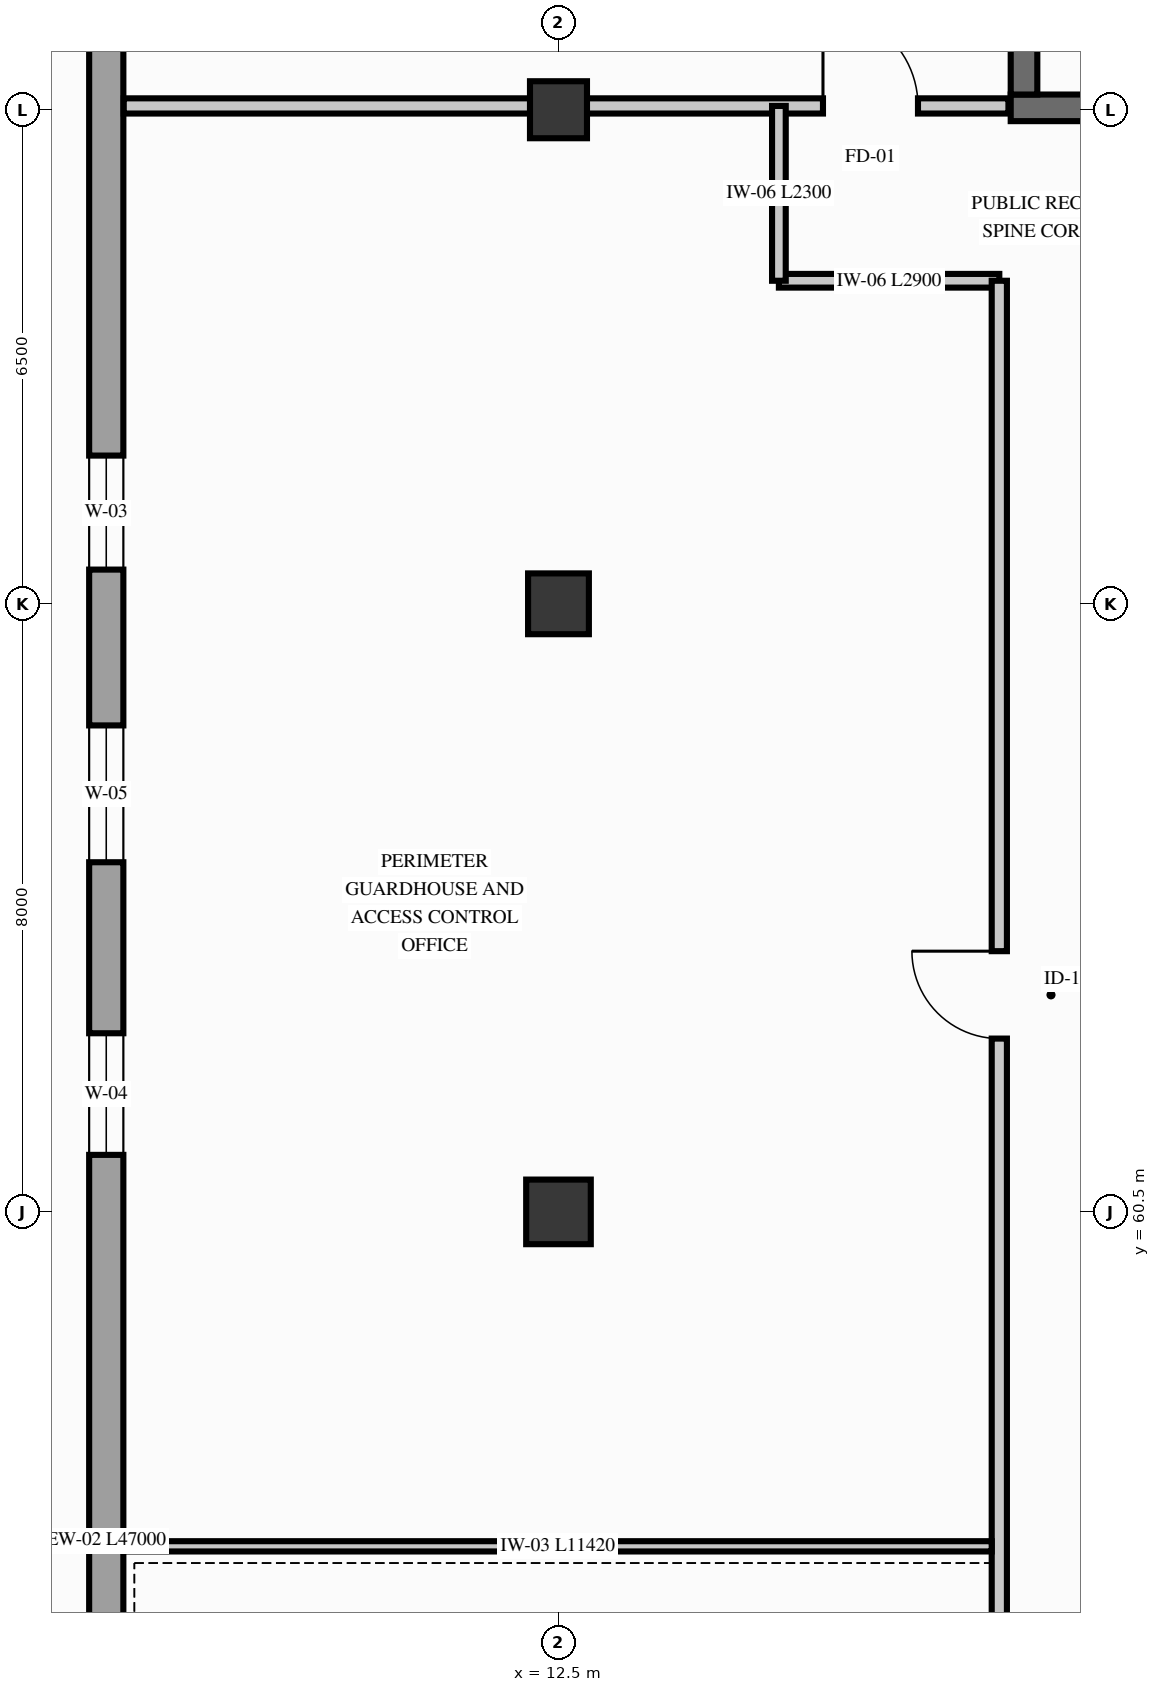
"""IFC4 building model, lengths in metres.
Left out: names, types, materials, properties, quantities, classifications, styles, units other than length and angle.
Written with IfcOpenShell. Run it as: python <this file> out.ifc"""

import sys

from ifc_helpers import new_model, si_unit, direction, frame, frame_2d, origin, origin_2d, place, context, subcontext, project, spatial, rectangle, extrude, element, fill, save


model = new_model("IFC4")
c1 = context("Model", 3, precision=1e-05, world=origin(), true_north=direction((0.0, 1.0)))
c2 = subcontext(c1, "Body", "Model", "MODEL_VIEW")
j1 = project(units=[si_unit("LENGTHUNIT", "METRE"), si_unit("PLANEANGLEUNIT", "RADIAN")], contexts=[c1])
p1 = place(None, origin())
s1 = spatial("IfcSite", under=j1, at=p1, CompositionType="ELEMENT")
p2 = place(p1, origin())
s2 = spatial("IfcBuilding", under=s1, at=p2, CompositionType="ELEMENT")
p3 = place(p2, origin())
s3 = spatial("IfcBuildingStorey", under=s2, at=p3, CompositionType="ELEMENT", Elevation=0.0)
p4 = place(p3, frame((18.45, 75.025, 0.0), z_axis=(0.0, 0.0, 1.0), x_axis=(1.0, 0.0, 0.0)))
e1 = element("IfcWall", 1, at=p4, inside=s3, PredefinedType="SHEAR", context=c2, shape_type="SweptSolid", body=[
    extrude(rectangle(XDim=8.3, YDim=0.35, at=frame_2d((4.15, 0.0))), origin(), (0.0, 0.0, 1.0), 4.88),
])
p5 = place(p3, frame((18.625, 75.2, 0.0), z_axis=(0.0, 0.0, 1.0), x_axis=(0.0, 1.0, 0.0)))
e2 = element("IfcWall", 2, at=p5, inside=s3, PredefinedType="SHEAR", context=c2, shape_type="SweptSolid", body=[
    extrude(rectangle(XDim=6.8, YDim=0.35, at=frame_2d((3.4, 0.0))), origin(), (0.0, 0.0, 1.0), 4.88),
])
p6 = place(p5, frame((2.6, 0.0, 0.0)))
e3 = element("IfcOpeningElement", 3, at=p6, cuts=e2, PredefinedType="OPENING", context=c2, shape_type="SweptSolid", body=[
    extrude(rectangle(XDim=1.32, YDim=2.24, at=frame_2d((0.66, 1.12))), frame((0.0, 0.185, 0.0), z_axis=(0.0, -1.0, 0.0), x_axis=(1.0, 0.0, 0.0)), (0.0, 0.0, 1.0), 0.37),
])
p7 = place(p3, frame((12.5, 60.5, 0.0), z_axis=(0.0, 0.0, 1.0), x_axis=(1.0, 0.0, 0.0)))
e4 = element("IfcColumn", 4, at=p7, inside=s3, PredefinedType="COLUMN", context=c2, shape_type="SweptSolid", body=[
    extrude(rectangle(XDim=0.85, YDim=0.85, at=origin_2d()), origin(), (0.0, 0.0, 1.0), 5.1),
])
p8 = place(p3, frame((12.5, 68.5, 0.0), z_axis=(0.0, 0.0, 1.0), x_axis=(1.0, 0.0, 0.0)))
e5 = element("IfcColumn", 5, at=p8, inside=s3, PredefinedType="COLUMN", context=c2, shape_type="SweptSolid", body=[
    extrude(rectangle(XDim=0.8, YDim=0.8, at=origin_2d()), origin(), (0.0, 0.0, 1.0), 5.1),
])
p9 = place(p3, frame((12.5, 75.0, 0.0), z_axis=(0.0, 0.0, 1.0), x_axis=(1.0, 0.0, 0.0)))
e6 = element("IfcColumn", 6, at=p9, inside=s3, PredefinedType="COLUMN", context=c2, shape_type="SweptSolid", body=[
    extrude(rectangle(XDim=0.75, YDim=0.75, at=origin_2d()), origin(), (0.0, 0.0, 1.0), 5.1),
])
p10 = place(p3, frame((6.55, 36.5, 0.0), z_axis=(0.0, 0.0, 1.0), x_axis=(0.0, 1.0, 0.0)))
e7 = element("IfcWall", 7, at=p10, inside=s3, PredefinedType="SOLIDWALL", context=c2, shape_type="SweptSolid", body=[
    extrude(rectangle(XDim=47.0, YDim=0.45, at=frame_2d((23.5, 0.0))), origin(), (0.0, 0.0, 1.0), 4.368),
])
p11 = place(p10, frame((40.5, 0.0, 0.0)))
e8 = element("IfcOpeningElement", 8, at=p11, cuts=e7, PredefinedType="OPENING", context=c2, shape_type="SweptSolid", body=[
    extrude(rectangle(XDim=1.8, YDim=2.4, at=frame_2d((0.9, 1.2))), frame((0.0, 0.235, 0.0), z_axis=(0.0, -1.0, 0.0), x_axis=(1.0, 0.0, 0.0)), (0.0, 0.0, 1.0), 0.47),
])
p12 = place(p10, frame((1.65, 0.0, 0.85)))
e9 = element("IfcOpeningElement", 9, at=p12, cuts=e7, PredefinedType="OPENING", context=c2, shape_type="SweptSolid", body=[
    extrude(rectangle(XDim=1.6, YDim=2.4, at=frame_2d((0.8, 1.2))), frame((0.0, 0.235, 0.0), z_axis=(0.0, -1.0, 0.0), x_axis=(1.0, 0.0, 0.0)), (0.0, 0.0, 1.0), 0.47),
])
p13 = place(p10, frame((5.5, 0.0, 0.85)))
e10 = element("IfcOpeningElement", 10, at=p13, cuts=e7, PredefinedType="OPENING", context=c2, shape_type="SweptSolid", body=[
    extrude(rectangle(XDim=1.8, YDim=2.4, at=frame_2d((0.9, 1.2))), frame((0.0, 0.235, 0.0), z_axis=(0.0, -1.0, 0.0), x_axis=(1.0, 0.0, 0.0)), (0.0, 0.0, 1.0), 0.47),
])
p14 = place(p10, frame((9.35, 0.0, 0.85)))
e11 = element("IfcOpeningElement", 11, at=p14, cuts=e7, PredefinedType="OPENING", context=c2, shape_type="SweptSolid", body=[
    extrude(rectangle(XDim=1.5, YDim=2.3, at=frame_2d((0.75, 1.15))), frame((0.0, 0.235, 0.0), z_axis=(0.0, -1.0, 0.0), x_axis=(1.0, 0.0, 0.0)), (0.0, 0.0, 1.0), 0.47),
])
p15 = place(p10, frame((13.2, 0.0, 0.85)))
e12 = element("IfcOpeningElement", 12, at=p15, cuts=e7, PredefinedType="OPENING", context=c2, shape_type="SweptSolid", body=[
    extrude(rectangle(XDim=1.4, YDim=2.2, at=frame_2d((0.7, 1.1))), frame((0.0, 0.235, 0.0), z_axis=(0.0, -1.0, 0.0), x_axis=(1.0, 0.0, 0.0)), (0.0, 0.0, 1.0), 0.47),
])
p16 = place(p10, frame((24.75, 0.0, 0.85)))
e13 = element("IfcOpeningElement", 13, at=p16, cuts=e7, PredefinedType="OPENING", context=c2, shape_type="SweptSolid", body=[
    extrude(rectangle(XDim=1.6, YDim=2.4, at=frame_2d((0.8, 1.2))), frame((0.0, 0.235, 0.0), z_axis=(0.0, -1.0, 0.0), x_axis=(1.0, 0.0, 0.0)), (0.0, 0.0, 1.0), 0.47),
])
p17 = place(p10, frame((28.6, 0.0, 0.85)))
e14 = element("IfcOpeningElement", 14, at=p17, cuts=e7, PredefinedType="OPENING", context=c2, shape_type="SweptSolid", body=[
    extrude(rectangle(XDim=1.8, YDim=2.4, at=frame_2d((0.9, 1.2))), frame((0.0, 0.235, 0.0), z_axis=(0.0, -1.0, 0.0), x_axis=(1.0, 0.0, 0.0)), (0.0, 0.0, 1.0), 0.47),
])
p18 = place(p10, frame((32.45, 0.0, 0.85)))
e15 = element("IfcOpeningElement", 15, at=p18, cuts=e7, PredefinedType="OPENING", context=c2, shape_type="SweptSolid", body=[
    extrude(rectangle(XDim=1.5, YDim=2.3, at=frame_2d((0.75, 1.15))), frame((0.0, 0.235, 0.0), z_axis=(0.0, -1.0, 0.0), x_axis=(1.0, 0.0, 0.0)), (0.0, 0.0, 1.0), 0.47),
])
p19 = place(p3, frame((6.78, 75.05, 0.0), z_axis=(0.0, 0.0, 1.0), x_axis=(1.0, 0.0, 0.0)))
e16 = element("IfcWall", 16, at=p19, inside=s3, PredefinedType="PARTITIONING", context=c2, shape_type="SweptSolid", body=[
    extrude(rectangle(XDim=11.64, YDim=0.2, at=frame_2d((5.82, 0.0))), origin(), (0.0, 0.0, 1.0), 4.37),
])
p20 = place(p19, frame((9.2, 0.0, 0.0)))
e17 = element("IfcOpeningElement", 17, at=p20, cuts=e16, PredefinedType="OPENING", context=c2, shape_type="SweptSolid", body=[
    extrude(rectangle(XDim=1.25, YDim=2.2, at=frame_2d((0.625, 1.1))), frame((0.0, 0.11, 0.0), z_axis=(0.0, -1.0, 0.0), x_axis=(1.0, 0.0, 0.0)), (0.0, 0.0, 1.0), 0.22),
])
p21 = place(p3, frame((15.4, 72.75, 0.0), z_axis=(0.0, 0.0, 1.0), x_axis=(1.0, 0.0, 0.0)))
e18 = element("IfcWall", 18, at=p21, inside=s3, PredefinedType="PARTITIONING", context=c2, shape_type="SweptSolid", body=[
    extrude(rectangle(XDim=2.9, YDim=0.18, at=frame_2d((1.45, 0.0))), origin(), (0.0, 0.0, 1.0), 4.54),
])
p22 = place(p3, frame((15.4, 72.75, 0.0), z_axis=(0.0, 0.0, 1.0), x_axis=(0.0, 1.0, 0.0)))
e19 = element("IfcWall", 19, at=p22, inside=s3, PredefinedType="PARTITIONING", context=c2, shape_type="SweptSolid", body=[
    extrude(rectangle(XDim=2.3, YDim=0.18, at=frame_2d((1.15, 0.0))), origin(), (0.0, 0.0, 1.0), 4.86),
])
p23 = place(p3, frame((18.3, 6.78, 0.0), z_axis=(0.0, 0.0, 1.0), x_axis=(0.0, 1.0, 0.0)))
e20 = element("IfcWall", 20, at=p23, inside=s3, PredefinedType="PARTITIONING", context=c2, shape_type="SweptSolid", body=[
    extrude(rectangle(XDim=65.97, YDim=0.2, at=frame_2d((32.985, 0.0))), origin(), (0.0, 0.0, 1.0), 4.368),
])
p24 = place(p23, frame((4.5, 0.0, 0.0)))
e21 = element("IfcOpeningElement", 21, at=p24, cuts=e20, PredefinedType="OPENING", context=c2, shape_type="SweptSolid", body=[
    extrude(rectangle(XDim=1.6, YDim=2.3, at=frame_2d((0.8, 1.15))), frame((0.0, 0.11, 0.0), z_axis=(0.0, -1.0, 0.0), x_axis=(1.0, 0.0, 0.0)), (0.0, 0.0, 1.0), 0.22),
])
p25 = place(p23, frame((18.0, 0.0, 0.0)))
e22 = element("IfcOpeningElement", 22, at=p25, cuts=e20, PredefinedType="OPENING", context=c2, shape_type="SweptSolid", body=[
    extrude(rectangle(XDim=1.15, YDim=2.2, at=frame_2d((0.575, 1.1))), frame((0.0, 0.11, 0.0), z_axis=(0.0, -1.0, 0.0), x_axis=(1.0, 0.0, 0.0)), (0.0, 0.0, 1.0), 0.22),
])
p26 = place(p23, frame((38.0, 0.0, 0.0)))
e23 = element("IfcOpeningElement", 23, at=p26, cuts=e20, PredefinedType="OPENING", context=c2, shape_type="SweptSolid", body=[
    extrude(rectangle(XDim=0.98, YDim=2.16, at=frame_2d((0.49, 1.08))), frame((0.0, 0.11, 0.0), z_axis=(0.0, -1.0, 0.0), x_axis=(1.0, 0.0, 0.0)), (0.0, 0.0, 1.0), 0.22),
])
p27 = place(p23, frame((56.0, 0.0, 0.0)))
e24 = element("IfcOpeningElement", 24, at=p27, cuts=e20, PredefinedType="OPENING", context=c2, shape_type="SweptSolid", body=[
    extrude(rectangle(XDim=1.15, YDim=2.2, at=frame_2d((0.575, 1.1))), frame((0.0, 0.11, 0.0), z_axis=(0.0, -1.0, 0.0), x_axis=(1.0, 0.0, 0.0)), (0.0, 0.0, 1.0), 0.22),
])
p28 = place(p3, frame((6.78, 56.1, 0.0), z_axis=(0.0, 0.0, 1.0), x_axis=(1.0, 0.0, 0.0)))
e25 = element("IfcWall", 25, at=p28, inside=s3, PredefinedType="PARTITIONING", context=c2, shape_type="SweptSolid", body=[
    extrude(rectangle(XDim=11.42, YDim=0.135, at=frame_2d((5.71, 0.0))), origin(), (0.0, 0.0, 1.0), 4.378),
])
p29 = place(p16, origin())
e26 = element("IfcWindow", 26, at=p29, inside=s3, PartitioningType="SINGLE_PANEL", PredefinedType="WINDOW", context=c2, shape_type="SweptSolid", body=[
    extrude(rectangle(XDim=1.6, YDim=2.4, at=frame_2d((0.8, 1.2))), frame((0.0, 0.03, 0.0), z_axis=(0.0, -1.0, 0.0), x_axis=(1.0, 0.0, 0.0)), (0.0, 0.0, 1.0), 0.06),
])
fill(e13, e26)
p30 = place(p17, origin())
e27 = element("IfcWindow", 27, at=p30, inside=s3, PartitioningType="SINGLE_PANEL", PredefinedType="WINDOW", context=c2, shape_type="SweptSolid", body=[
    extrude(rectangle(XDim=1.8, YDim=2.4, at=frame_2d((0.9, 1.2))), frame((0.0, 0.03, 0.0), z_axis=(0.0, -1.0, 0.0), x_axis=(1.0, 0.0, 0.0)), (0.0, 0.0, 1.0), 0.06),
])
fill(e14, e27)
p31 = place(p18, origin())
e28 = element("IfcWindow", 28, at=p31, inside=s3, PartitioningType="SINGLE_PANEL", PredefinedType="WINDOW", context=c2, shape_type="SweptSolid", body=[
    extrude(rectangle(XDim=1.5, YDim=2.3, at=frame_2d((0.75, 1.15))), frame((0.0, 0.03, 0.0), z_axis=(0.0, -1.0, 0.0), x_axis=(1.0, 0.0, 0.0)), (0.0, 0.0, 1.0), 0.06),
])
fill(e15, e28)
p32 = place(p20, origin())
e29 = element("IfcDoor", 29, at=p32, inside=s3, OperationType="SINGLE_SWING_LEFT", PredefinedType="DOOR", context=c2, shape_type="SweptSolid", body=[
    extrude(rectangle(XDim=1.25, YDim=2.2, at=frame_2d((0.625, 1.1))), frame((0.0, 0.025, 0.0), z_axis=(0.0, -1.0, 0.0), x_axis=(1.0, 0.0, 0.0)), (0.0, 0.0, 1.0), 0.05),
])
fill(e17, e29)
p33 = place(p27, origin())
e30 = element("IfcDoor", 30, at=p33, inside=s3, OperationType="SINGLE_SWING_RIGHT", PredefinedType="DOOR", context=c2, shape_type="SweptSolid", body=[
    extrude(rectangle(XDim=1.15, YDim=2.2, at=frame_2d((0.575, 1.1))), frame((0.0, 0.025, 0.0), z_axis=(0.0, -1.0, 0.0), x_axis=(1.0, 0.0, 0.0)), (0.0, 0.0, 1.0), 0.05),
])
fill(e24, e30)
save(model, sys.argv[1])
